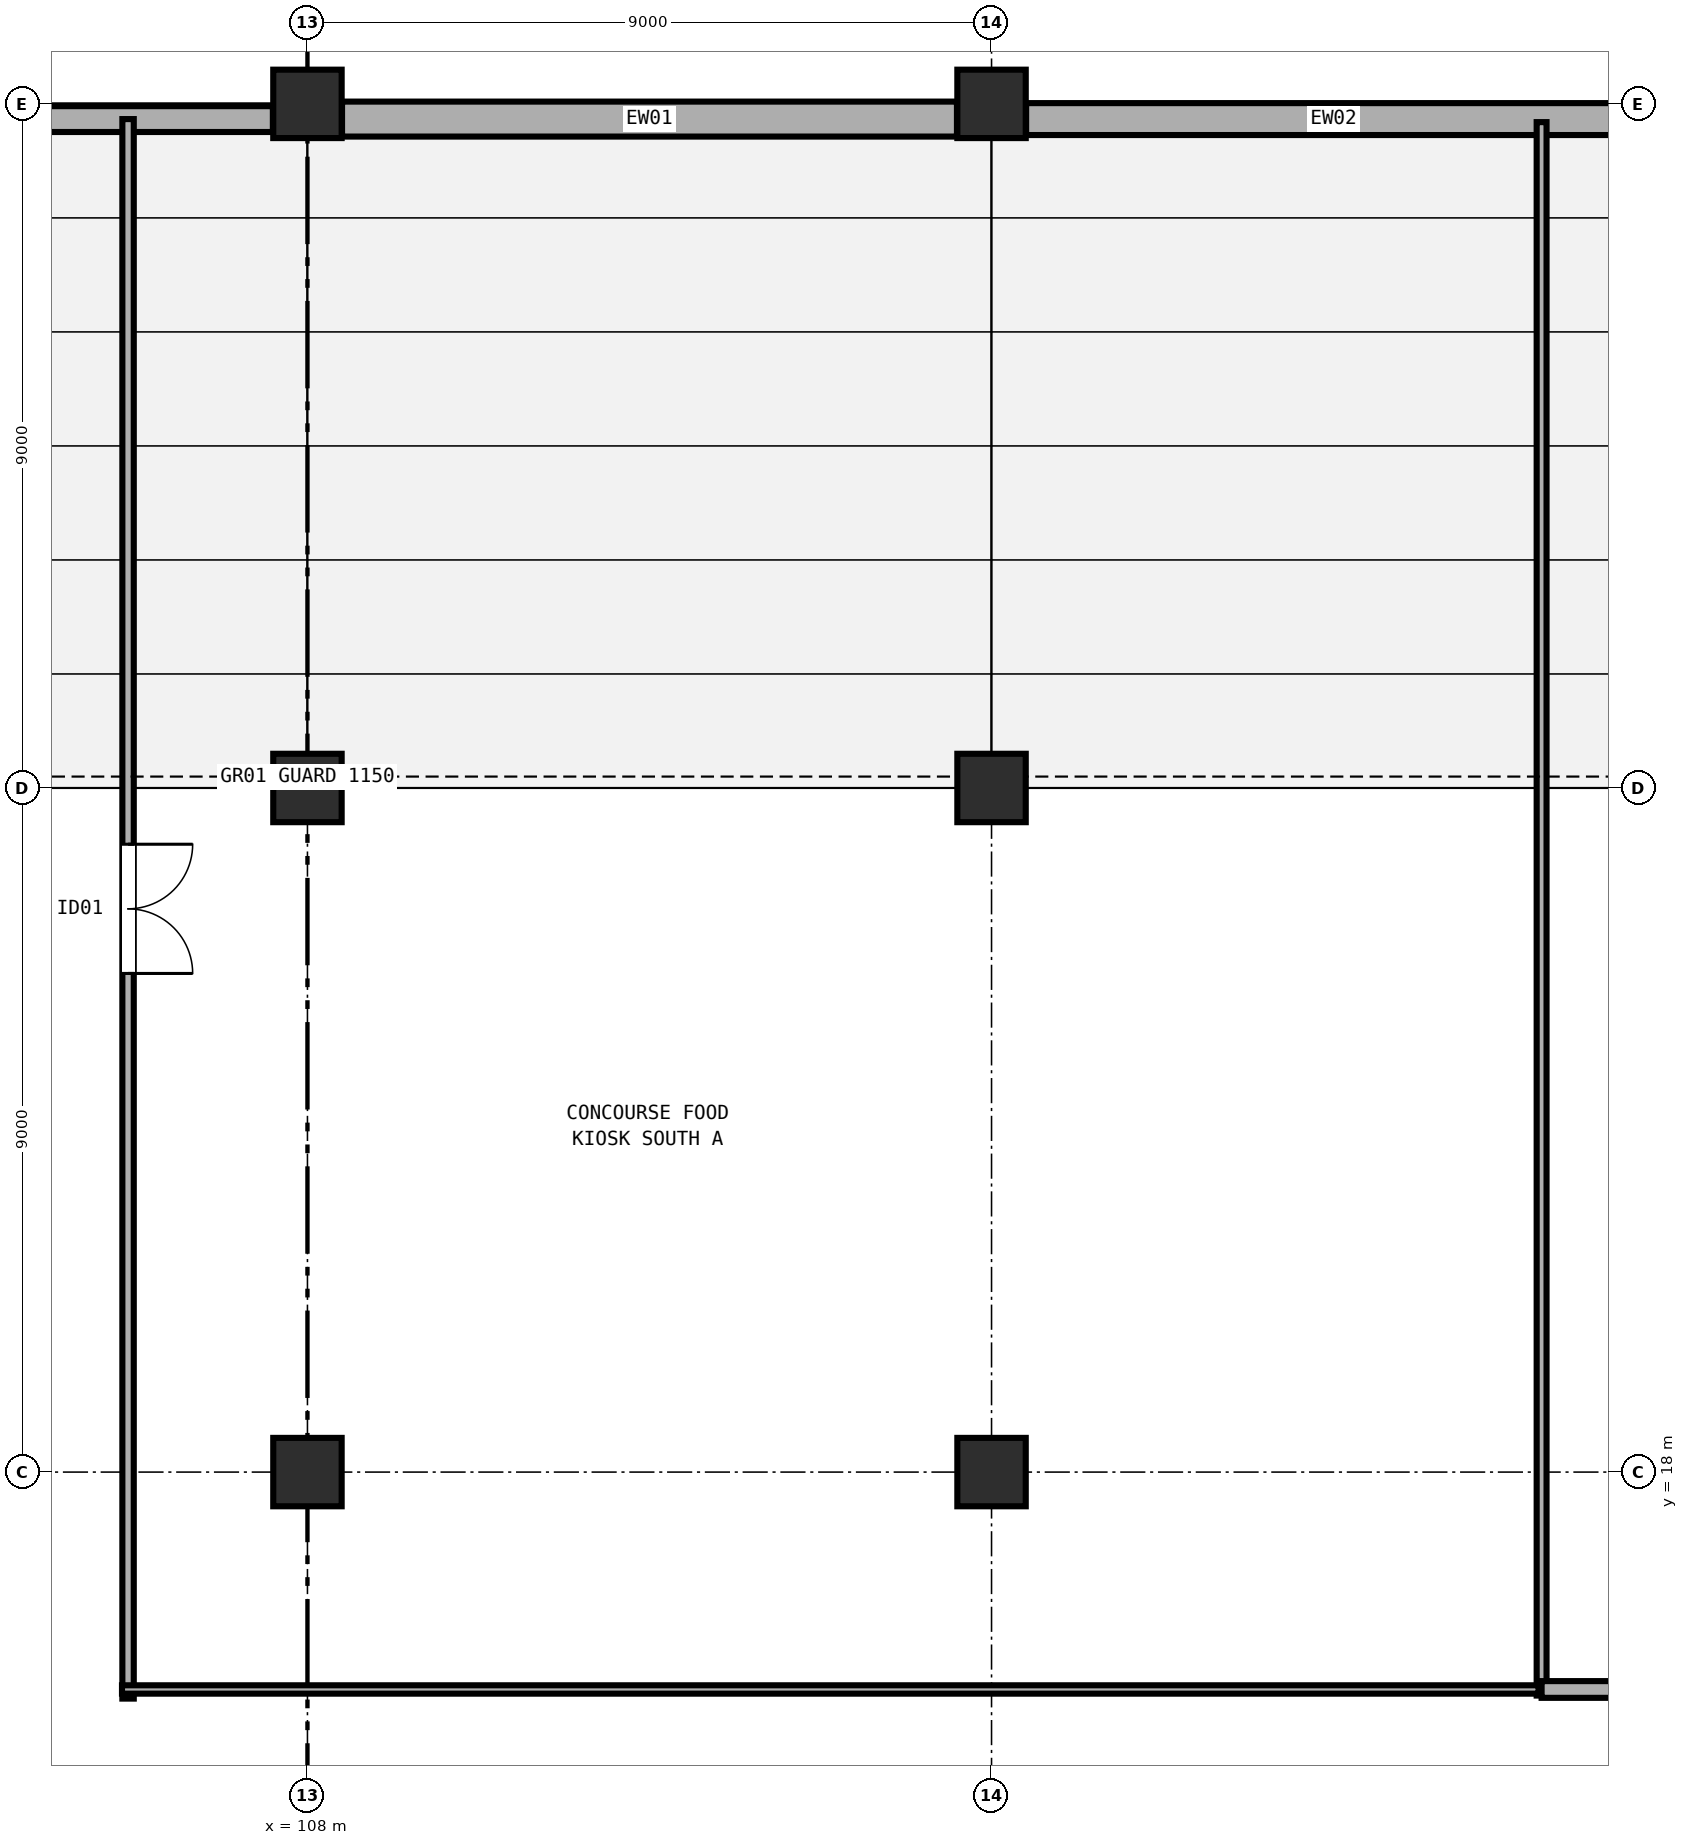
"""IFC4 building model, lengths in metres.
Left out: names, types, materials, properties, quantities, classifications, styles, units other than length and angle.
Written with IfcOpenShell. Run it as: python <this file> out.ifc"""

import sys

from ifc_helpers import new_model, si_unit, direction, frame, frame_2d, origin, origin_2d, place, context, subcontext, project, spatial, rectangle, extrude, element, fill, save


model = new_model("IFC4")
c1 = context("Model", 3, precision=1e-05, world=origin(), true_north=direction((0.0, 1.0)))
c2 = subcontext(c1, "Body", "Model", "MODEL_VIEW")
j1 = project(units=[si_unit("LENGTHUNIT", "METRE"), si_unit("PLANEANGLEUNIT", "RADIAN")], contexts=[c1])
p1 = place(None, origin())
s1 = spatial("IfcSite", under=j1, at=p1, CompositionType="ELEMENT")
p2 = place(p1, origin())
s2 = spatial("IfcBuilding", under=s1, at=p2, CompositionType="ELEMENT")
p3 = place(p2, frame((0.0, 0.0, 4.8)))
s3 = spatial("IfcBuildingStorey", under=s2, at=p3, CompositionType="ELEMENT", Elevation=4.8)
for number, where, z_axis, x_axis in (
    (1, (108.0, 18.0, 0.0), (0.0, 0.0, 1.0), (1.0, 0.0, 0.0)),
    (2, (108.0, 27.0, 0.0), (0.0, 0.0, 1.0), (1.0, 0.0, 0.0)),
    (3, (108.0, 36.0, 0.0), (0.0, 0.0, 1.0), (1.0, 0.0, 0.0)),
    (4, (117.0, 18.0, 0.0), (0.0, 0.0, 1.0), (1.0, 0.0, 0.0)),
    (5, (117.0, 27.0, 0.0), (0.0, 0.0, 1.0), (1.0, 0.0, 0.0)),
    (6, (117.0, 36.0, 0.0), (0.0, 0.0, 1.0), (1.0, 0.0, 0.0)),
):
    element("IfcColumn", number, at=place(p3, frame(where, z_axis=z_axis, x_axis=x_axis)), inside=s3, PredefinedType="COLUMN", context=c2, shape_type="SweptSolid", body=[
        extrude(rectangle(XDim=0.9, YDim=0.9, at=origin_2d()), origin(), (0.0, 0.0, 1.0), 4.8),
    ])
p4 = place(p3, frame((99.455, 35.8, 0.0), z_axis=(0.0, 0.0, 1.0), x_axis=(1.0, 0.0, 0.0)))
e7 = element("IfcWall", 7, at=p4, inside=s3, PredefinedType="SOLIDWALL", context=c2, shape_type="SweptSolid", body=[
    extrude(rectangle(XDim=8.09, YDim=0.34, at=frame_2d((4.045, 0.0))), origin(), (0.0, 0.0, 1.0), 3.28),
])
p5 = place(p3, frame((108.455, 35.8, 0.0), z_axis=(0.0, 0.0, 1.0), x_axis=(1.0, 0.0, 0.0)))
e8 = element("IfcWall", 8, at=p5, inside=s3, PredefinedType="SOLIDWALL", context=c2, shape_type="SweptSolid", body=[
    extrude(rectangle(XDim=8.09, YDim=0.46, at=frame_2d((4.045, 0.0))), origin(), (0.0, 0.0, 1.0), 3.28),
])
p6 = place(p3, frame((117.455, 35.8, 0.0), z_axis=(0.0, 0.0, 1.0), x_axis=(1.0, 0.0, 0.0)))
e9 = element("IfcWall", 9, at=p6, inside=s3, PredefinedType="SOLIDWALL", context=c2, shape_type="SweptSolid", body=[
    extrude(rectangle(XDim=8.09, YDim=0.42, at=frame_2d((4.045, 0.0))), origin(), (0.0, 0.0, 1.0), 3.28),
])
p7 = place(p3, frame((105.64, 35.8, 0.0), z_axis=(0.0, 0.0, 1.0), x_axis=(0.0, -1.0, 0.0)))
e10 = element("IfcWall", 10, at=p7, inside=s3, PredefinedType="PARTITIONING", context=c2, shape_type="SweptSolid", body=[
    extrude(rectangle(XDim=20.78, YDim=0.15, at=frame_2d((10.39, 0.0))), origin(), (0.0, 0.0, 1.0), 3.28),
])
p8 = place(p7, frame((9.54, 0.0, 0.0)))
e11 = element("IfcOpeningElement", 11, at=p8, cuts=e10, PredefinedType="OPENING", context=c2, shape_type="SweptSolid", body=[
    extrude(rectangle(XDim=1.7, YDim=2.2, at=frame_2d((0.85, 1.1))), frame((0.0, 0.085, 0.0), z_axis=(0.0, -1.0, 0.0), x_axis=(1.0, 0.0, 0.0)), (0.0, 0.0, 1.0), 0.17),
])
p9 = place(p3, frame((124.237, 35.76, 0.0), z_axis=(0.0, 0.0, 1.0), x_axis=(0.0, -1.0, 0.0)))
e12 = element("IfcWall", 12, at=p9, inside=s3, PredefinedType="PARTITIONING", context=c2, shape_type="SweptSolid", body=[
    extrude(rectangle(XDim=20.7, YDim=0.13, at=frame_2d((10.35, 0.0))), origin(), (0.0, 0.0, 1.0), 3.28),
])
p10 = place(p3, frame((124.197, 15.14, 0.0), z_axis=(0.0, 0.0, 1.0), x_axis=(-1.0, 0.0, 0.0)))
e13 = element("IfcWall", 13, at=p10, inside=s3, PredefinedType="PARTITIONING", context=c2, shape_type="SweptSolid", body=[
    extrude(rectangle(XDim=18.637, YDim=0.11, at=frame_2d((9.318, 0.0))), origin(), (0.0, 0.0, 1.0), 3.28),
])
p11 = place(p3, frame((124.237, 15.14, 0.0), z_axis=(0.0, 0.0, 1.0), x_axis=(1.0, 0.0, 0.0)))
e14 = element("IfcWall", 14, at=p11, inside=s3, PredefinedType="PARTITIONING", context=c2, shape_type="SweptSolid", body=[
    extrude(rectangle(XDim=18.596, YDim=0.22, at=frame_2d((9.298, 0.0))), origin(), (0.0, 0.0, 1.0), 3.28),
])
p12 = place(p11, frame((8.523, 0.0, 0.0)))
e15 = element("IfcOpeningElement", 15, at=p12, cuts=e14, PredefinedType="OPENING", context=c2, shape_type="SweptSolid", body=[
    extrude(rectangle(XDim=1.55, YDim=2.2, at=frame_2d((0.775, 1.1))), frame((0.0, 0.12, 0.0), z_axis=(0.0, -1.0, 0.0), x_axis=(1.0, 0.0, 0.0)), (0.0, 0.0, 1.0), 0.24),
])
p13 = place(p8, origin())
e16 = element("IfcDoor", 16, at=p13, inside=s3, OperationType="DOUBLE_DOOR_SINGLE_SWING", PredefinedType="DOOR", context=c2, shape_type="SweptSolid", body=[
    extrude(rectangle(XDim=1.7, YDim=2.2, at=frame_2d((0.85, 1.1))), frame((0.0, 0.025, 0.0), z_axis=(0.0, -1.0, 0.0), x_axis=(1.0, 0.0, 0.0)), (0.0, 0.0, 1.0), 0.05),
])
fill(e11, e16)
save(model, sys.argv[1])
